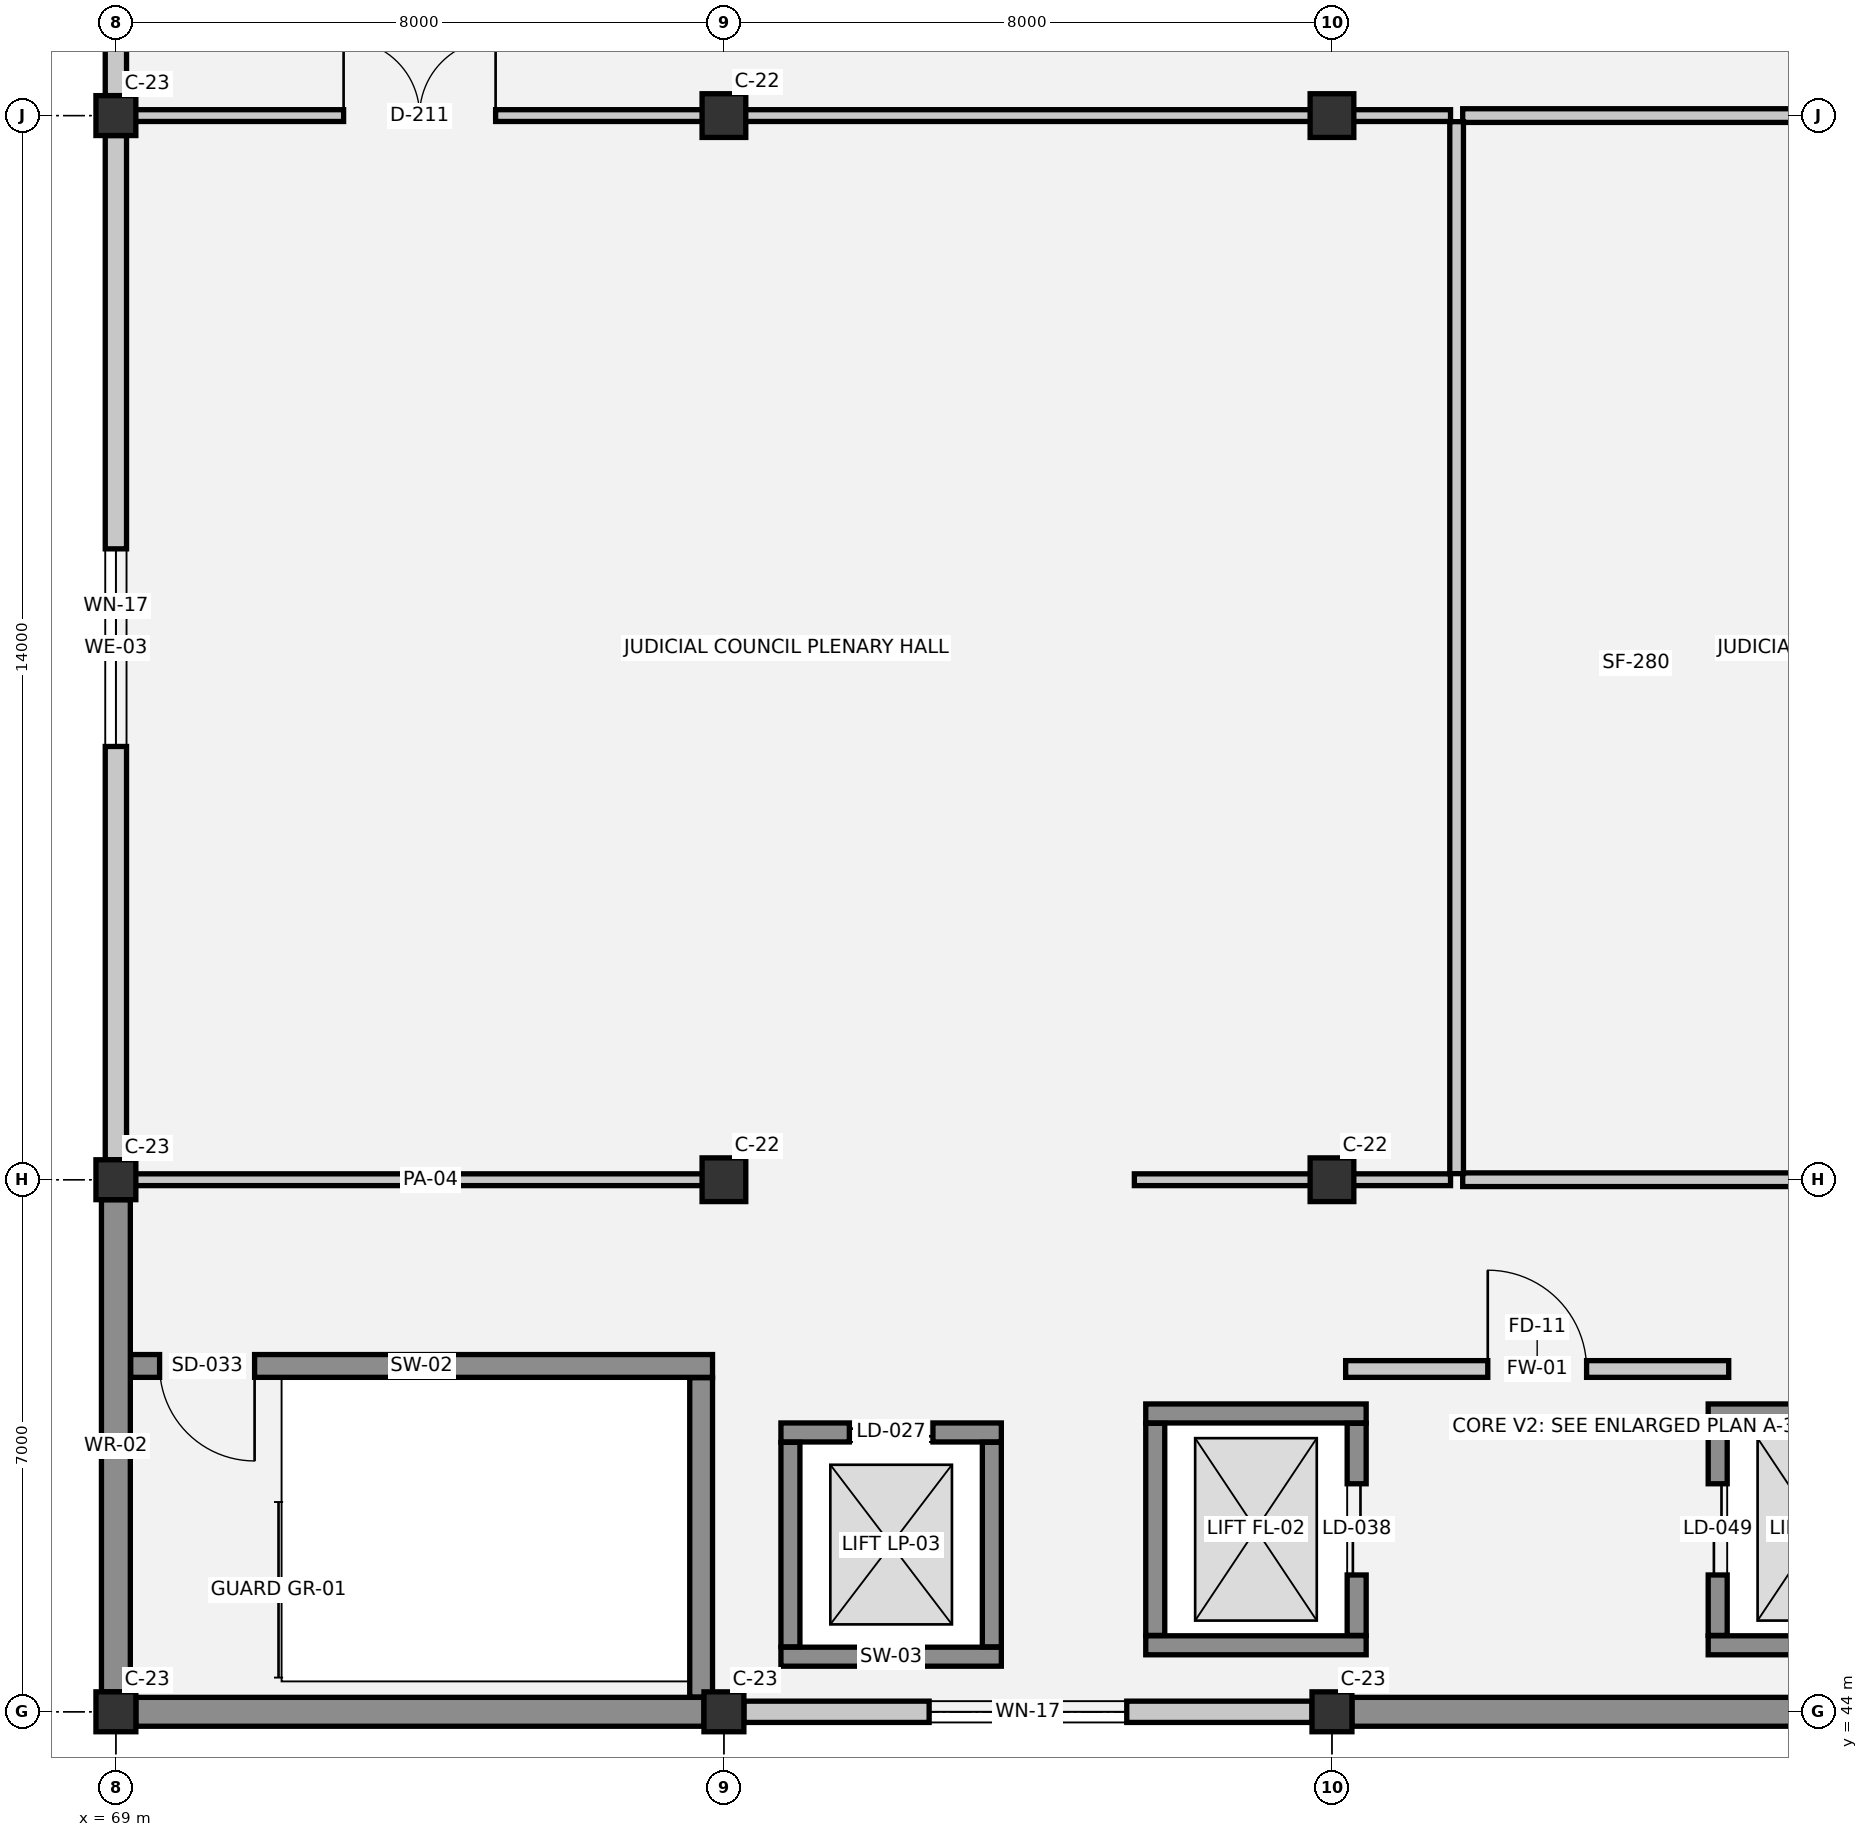
"""IFC4 building model, lengths in metres.
Left out: names, types, materials, properties, quantities, classifications, styles, units other than length and angle.
Written with IfcOpenShell. Run it as: python <this file> out.ifc"""

import sys

from ifc_helpers import new_model, si_unit, direction, frame, frame_2d, origin, origin_2d, place, context, subcontext, project, spatial, rectangle, extrude, element, fill, save


model = new_model("IFC4")
c1 = context("Model", 3, precision=1e-05, world=origin(), true_north=direction((0.0, 1.0)))
c2 = subcontext(c1, "Body", "Model", "MODEL_VIEW")
j1 = project(units=[si_unit("LENGTHUNIT", "METRE"), si_unit("PLANEANGLEUNIT", "RADIAN")], contexts=[c1])
p1 = place(None, origin())
s1 = spatial("IfcSite", under=j1, at=p1, CompositionType="ELEMENT")
p2 = place(p1, origin())
s2 = spatial("IfcBuilding", under=s1, at=p2, CompositionType="ELEMENT")
p3 = place(p2, frame((0.0, 0.0, 37.05)))
s3 = spatial("IfcBuildingStorey", under=s2, at=p3, CompositionType="ELEMENT", Elevation=37.05)
for number, where, z_axis, x_axis in (
    (1, (69.0, 44.0, 0.0), (0.0, 0.0, 1.0), (1.0, 0.0, 0.0)),
    (2, (69.0, 51.0, 0.0), (0.0, 0.0, 1.0), (1.0, 0.0, 0.0)),
    (3, (69.0, 65.0, 0.0), (0.0, 0.0, 1.0), (1.0, 0.0, 0.0)),
    (4, (77.0, 44.0, 0.0), (0.0, 0.0, 1.0), (1.0, 0.0, 0.0)),
):
    element("IfcColumn", number, at=place(p3, frame(where, z_axis=z_axis, x_axis=x_axis)), inside=s3, PredefinedType="COLUMN", context=c2, shape_type="SweptSolid", body=[
        extrude(rectangle(XDim=0.525, YDim=0.525, at=origin_2d()), origin(), (0.0, 0.0, 1.0), 3.75),
    ])
for number, where, z_axis, x_axis in (
    (5, (77.0, 51.0, 0.0), (0.0, 0.0, 1.0), (1.0, 0.0, 0.0)),
    (6, (77.0, 65.0, 0.0), (0.0, 0.0, 1.0), (1.0, 0.0, 0.0)),
):
    element("IfcColumn", number, at=place(p3, frame(where, z_axis=z_axis, x_axis=x_axis)), inside=s3, PredefinedType="COLUMN", context=c2, shape_type="SweptSolid", body=[
        extrude(rectangle(XDim=0.575, YDim=0.575, at=origin_2d()), origin(), (0.0, 0.0, 1.0), 3.75),
    ])
p4 = place(p3, frame((85.0, 44.0, 0.0), z_axis=(0.0, 0.0, 1.0), x_axis=(1.0, 0.0, 0.0)))
e7 = element("IfcColumn", 7, at=p4, inside=s3, PredefinedType="COLUMN", context=c2, shape_type="SweptSolid", body=[
    extrude(rectangle(XDim=0.525, YDim=0.525, at=origin_2d()), origin(), (0.0, 0.0, 1.0), 3.75),
])
for number, where, z_axis, x_axis in (
    (8, (85.0, 51.0, 0.0), (0.0, 0.0, 1.0), (1.0, 0.0, 0.0)),
    (9, (85.0, 65.0, 0.0), (0.0, 0.0, 1.0), (1.0, 0.0, 0.0)),
):
    element("IfcColumn", number, at=place(p3, frame(where, z_axis=z_axis, x_axis=x_axis)), inside=s3, PredefinedType="COLUMN", context=c2, shape_type="SweptSolid", body=[
        extrude(rectangle(XDim=0.575, YDim=0.575, at=origin_2d()), origin(), (0.0, 0.0, 1.0), 3.75),
    ])
p5 = place(p3, frame((69.0, 44.262, 0.0), z_axis=(0.0, 0.0, 1.0), x_axis=(0.0, 1.0, 0.0)))
e10 = element("IfcWall", 10, at=p5, inside=s3, PredefinedType="STANDARD", context=c2, shape_type="SweptSolid", body=[
    extrude(rectangle(XDim=6.475, YDim=0.38, at=frame_2d((3.238, 0.0))), origin(), (0.0, 0.0, 1.0), 2.6),
])
p6 = place(p3, frame((69.0, 51.262, 0.0), z_axis=(0.0, 0.0, 1.0), x_axis=(0.0, 1.0, 0.0)))
e11 = element("IfcWall", 11, at=p6, inside=s3, PredefinedType="SOLIDWALL", context=c2, shape_type="SweptSolid", body=[
    extrude(rectangle(XDim=13.475, YDim=0.28, at=frame_2d((6.738, 0.0))), origin(), (0.0, 0.0, 1.0), 2.6),
])
p7 = place(p6, frame((5.438, 0.0, 1.0)))
e12 = element("IfcOpeningElement", 12, at=p7, cuts=e11, PredefinedType="OPENING", context=c2, shape_type="SweptSolid", body=[
    extrude(rectangle(XDim=2.6, YDim=1.1, at=frame_2d((1.3, 0.55))), frame((0.0, 0.15, 0.0), z_axis=(0.0, -1.0, 0.0), x_axis=(1.0, 0.0, 0.0)), (0.0, 0.0, 1.0), 0.3),
])
p8 = place(p3, frame((69.0, 65.262, 0.0), z_axis=(0.0, 0.0, 1.0), x_axis=(0.0, 1.0, 0.0)))
e13 = element("IfcWall", 13, at=p8, inside=s3, PredefinedType="SOLIDWALL", context=c2, shape_type="SweptSolid", body=[
    extrude(rectangle(XDim=6.475, YDim=0.28, at=frame_2d((3.238, 0.0))), origin(), (0.0, 0.0, 1.0), 2.6),
])
p9 = place(p8, frame((2.158, 0.0, 1.0)))
e14 = element("IfcOpeningElement", 14, at=p9, cuts=e13, PredefinedType="OPENING", context=c2, shape_type="SweptSolid", body=[
    extrude(rectangle(XDim=2.6, YDim=1.1, at=frame_2d((1.3, 0.55))), frame((0.0, 0.15, 0.0), z_axis=(0.0, -1.0, 0.0), x_axis=(1.0, 0.0, 0.0)), (0.0, 0.0, 1.0), 0.3),
])
p10 = place(p3, frame((92.738, 44.0, 0.0), z_axis=(0.0, 0.0, 1.0), x_axis=(-1.0, 0.0, 0.0)))
e15 = element("IfcWall", 15, at=p10, inside=s3, PredefinedType="STANDARD", context=c2, shape_type="SweptSolid", body=[
    extrude(rectangle(XDim=7.475, YDim=0.38, at=frame_2d((3.738, 0.0))), origin(), (0.0, 0.0, 1.0), 2.6),
])
p11 = place(p3, frame((84.738, 44.0, 0.0), z_axis=(0.0, 0.0, 1.0), x_axis=(-1.0, 0.0, 0.0)))
e16 = element("IfcWall", 16, at=p11, inside=s3, PredefinedType="SOLIDWALL", context=c2, shape_type="SweptSolid", body=[
    extrude(rectangle(XDim=7.475, YDim=0.28, at=frame_2d((3.738, 0.0))), origin(), (0.0, 0.0, 1.0), 2.6),
])
p12 = place(p11, frame((2.438, 0.0, 1.0)))
e17 = element("IfcOpeningElement", 17, at=p12, cuts=e16, PredefinedType="OPENING", context=c2, shape_type="SweptSolid", body=[
    extrude(rectangle(XDim=2.6, YDim=1.1, at=frame_2d((1.3, 0.55))), frame((0.0, 0.15, 0.0), z_axis=(0.0, -1.0, 0.0), x_axis=(1.0, 0.0, 0.0)), (0.0, 0.0, 1.0), 0.3),
])
p13 = place(p3, frame((76.738, 44.0, 0.0), z_axis=(0.0, 0.0, 1.0), x_axis=(-1.0, 0.0, 0.0)))
e18 = element("IfcWall", 18, at=p13, inside=s3, PredefinedType="STANDARD", context=c2, shape_type="SweptSolid", body=[
    extrude(rectangle(XDim=7.475, YDim=0.38, at=frame_2d((3.738, 0.0))), origin(), (0.0, 0.0, 1.0), 2.6),
])
p14 = place(p3, frame((77.75, 44.725, 0.0), z_axis=(0.0, 0.0, 1.0), x_axis=(1.0, 0.0, 0.0)))
e19 = element("IfcWall", 19, at=p14, inside=s3, PredefinedType="SHEAR", context=c2, shape_type="SweptSolid", body=[
    extrude(rectangle(XDim=2.9, YDim=0.25, at=frame_2d((1.45, 0.0))), origin(), (0.0, 0.0, 1.0), 3.47),
])
p15 = place(p3, frame((80.65, 47.675, 0.0), z_axis=(0.0, 0.0, 1.0), x_axis=(-1.0, 0.0, 0.0)))
e20 = element("IfcWall", 20, at=p15, inside=s3, PredefinedType="SHEAR", context=c2, shape_type="SweptSolid", body=[
    extrude(rectangle(XDim=2.9, YDim=0.25, at=frame_2d((1.45, 0.0))), origin(), (0.0, 0.0, 1.0), 3.47),
])
p16 = place(p15, frame((0.9, 0.0, 0.0)))
e21 = element("IfcOpeningElement", 21, at=p16, cuts=e20, PredefinedType="OPENING", context=c2, shape_type="SweptSolid", body=[
    extrude(rectangle(XDim=1.1, YDim=2.15, at=frame_2d((0.55, 1.075))), frame((0.0, 0.135, 0.0), z_axis=(0.0, -1.0, 0.0), x_axis=(1.0, 0.0, 0.0)), (0.0, 0.0, 1.0), 0.27),
])
for number, where, z_axis, x_axis in (
    (22, (77.875, 47.545, 0.0), (0.0, 0.0, 1.0), (0.0, -1.0, 0.0)),
    (23, (80.525, 44.855, 0.0), (0.0, 0.0, 1.0), (0.0, 1.0, 0.0)),
):
    element("IfcWall", number, at=place(p3, frame(where, z_axis=z_axis, x_axis=x_axis)), inside=s3, PredefinedType="SHEAR", context=c2, shape_type="SweptSolid", body=[
        extrude(rectangle(XDim=2.69, YDim=0.25, at=frame_2d((1.345, 0.0))), origin(), (0.0, 0.0, 1.0), 3.47),
    ])
for number, where, z_axis, x_axis in (
    (24, (82.55, 44.875, 0.0), (0.0, 0.0, 1.0), (1.0, 0.0, 0.0)),
    (25, (85.45, 47.925, 0.0), (0.0, 0.0, 1.0), (-1.0, 0.0, 0.0)),
):
    element("IfcWall", number, at=place(p3, frame(where, z_axis=z_axis, x_axis=x_axis)), inside=s3, PredefinedType="SHEAR", context=c2, shape_type="SweptSolid", body=[
        extrude(rectangle(XDim=2.9, YDim=0.25, at=frame_2d((1.45, 0.0))), origin(), (0.0, 0.0, 1.0), 3.47),
    ])
p17 = place(p3, frame((82.675, 47.795, 0.0), z_axis=(0.0, 0.0, 1.0), x_axis=(0.0, -1.0, 0.0)))
e26 = element("IfcWall", 26, at=p17, inside=s3, PredefinedType="SHEAR", context=c2, shape_type="SweptSolid", body=[
    extrude(rectangle(XDim=2.79, YDim=0.25, at=frame_2d((1.395, 0.0))), origin(), (0.0, 0.0, 1.0), 3.47),
])
p18 = place(p3, frame((85.325, 45.005, 0.0), z_axis=(0.0, 0.0, 1.0), x_axis=(0.0, 1.0, 0.0)))
e27 = element("IfcWall", 27, at=p18, inside=s3, PredefinedType="SHEAR", context=c2, shape_type="SweptSolid", body=[
    extrude(rectangle(XDim=2.79, YDim=0.25, at=frame_2d((1.395, 0.0))), origin(), (0.0, 0.0, 1.0), 3.47),
])
p19 = place(p18, frame((0.795, 0.0, 0.0)))
e28 = element("IfcOpeningElement", 28, at=p19, cuts=e27, PredefinedType="OPENING", context=c2, shape_type="SweptSolid", body=[
    extrude(rectangle(XDim=1.2, YDim=2.2, at=frame_2d((0.6, 1.1))), frame((0.0, 0.135, 0.0), z_axis=(0.0, -1.0, 0.0), x_axis=(1.0, 0.0, 0.0)), (0.0, 0.0, 1.0), 0.27),
])
for number, where, z_axis, x_axis in (
    (29, (89.95, 44.875, 0.0), (0.0, 0.0, 1.0), (1.0, 0.0, 0.0)),
    (30, (92.85, 47.925, 0.0), (0.0, 0.0, 1.0), (-1.0, 0.0, 0.0)),
):
    element("IfcWall", number, at=place(p3, frame(where, z_axis=z_axis, x_axis=x_axis)), inside=s3, PredefinedType="SHEAR", context=c2, shape_type="SweptSolid", body=[
        extrude(rectangle(XDim=2.9, YDim=0.25, at=frame_2d((1.45, 0.0))), origin(), (0.0, 0.0, 1.0), 3.47),
    ])
p20 = place(p3, frame((90.075, 47.795, 0.0), z_axis=(0.0, 0.0, 1.0), x_axis=(0.0, -1.0, 0.0)))
e31 = element("IfcWall", 31, at=p20, inside=s3, PredefinedType="SHEAR", context=c2, shape_type="SweptSolid", body=[
    extrude(rectangle(XDim=2.79, YDim=0.25, at=frame_2d((1.395, 0.0))), origin(), (0.0, 0.0, 1.0), 3.47),
])
p21 = place(p20, frame((0.795, 0.0, 0.0)))
e32 = element("IfcOpeningElement", 32, at=p21, cuts=e31, PredefinedType="OPENING", context=c2, shape_type="SweptSolid", body=[
    extrude(rectangle(XDim=1.2, YDim=2.2, at=frame_2d((0.6, 1.1))), frame((0.0, 0.135, 0.0), z_axis=(0.0, -1.0, 0.0), x_axis=(1.0, 0.0, 0.0)), (0.0, 0.0, 1.0), 0.27),
])
p22 = place(p3, frame((76.85, 48.55, 0.0), z_axis=(0.0, 0.0, 1.0), x_axis=(-1.0, 0.0, 0.0)))
e33 = element("IfcWall", 33, at=p22, inside=s3, PredefinedType="SHEAR", context=c2, shape_type="SweptSolid", body=[
    extrude(rectangle(XDim=7.655, YDim=0.3, at=frame_2d((3.828, 0.0))), origin(), (0.0, 0.0, 1.0), 3.47),
])
p23 = place(p22, frame((6.025, 0.0, 0.0)))
e34 = element("IfcOpeningElement", 34, at=p23, cuts=e33, PredefinedType="OPENING", context=c2, shape_type="SweptSolid", body=[
    extrude(rectangle(XDim=1.25, YDim=2.15, at=frame_2d((0.625, 1.075))), frame((0.0, 0.16, 0.0), z_axis=(0.0, -1.0, 0.0), x_axis=(1.0, 0.0, 0.0)), (0.0, 0.0, 1.0), 0.32),
])
p24 = place(p3, frame((76.7, 44.195, 0.0), z_axis=(0.0, 0.0, 1.0), x_axis=(0.0, 1.0, 0.0)))
e35 = element("IfcWall", 35, at=p24, inside=s3, PredefinedType="SHEAR", context=c2, shape_type="SweptSolid", body=[
    extrude(rectangle(XDim=4.2, YDim=0.3, at=frame_2d((2.1, 0.0))), origin(), (0.0, 0.0, 1.0), 3.47),
])
p25 = place(p3, frame((85.18, 48.51, 0.0), z_axis=(0.0, 0.0, 1.0), x_axis=(1.0, 0.0, 0.0)))
e36 = element("IfcWall", 36, at=p25, inside=s3, PredefinedType="SOLIDWALL", context=c2, shape_type="SweptSolid", body=[
    extrude(rectangle(XDim=5.04, YDim=0.22, at=frame_2d((2.52, 0.0))), origin(), (0.0, 0.0, 1.0), 3.47),
])
p26 = place(p25, frame((1.87, 0.0, 0.0)))
e37 = element("IfcOpeningElement", 37, at=p26, cuts=e36, PredefinedType="OPENING", context=c2, shape_type="SweptSolid", body=[
    extrude(rectangle(XDim=1.3, YDim=2.15, at=frame_2d((0.65, 1.075))), frame((0.0, 0.12, 0.0), z_axis=(0.0, -1.0, 0.0), x_axis=(1.0, 0.0, 0.0)), (0.0, 0.0, 1.0), 0.24),
])
p27 = place(p3, frame((69.08, 51.0, 0.0), z_axis=(0.0, 0.0, 1.0), x_axis=(1.0, 0.0, 0.0)))
e38 = element("IfcWall", 38, at=p27, inside=s3, PredefinedType="PARTITIONING", context=c2, shape_type="SweptSolid", body=[
    extrude(rectangle(XDim=8.12, YDim=0.155, at=frame_2d((4.06, 0.0))), origin(), (0.0, 0.0, 1.0), 2.82),
])
p28 = place(p3, frame((82.4, 51.0, 0.0), z_axis=(0.0, 0.0, 1.0), x_axis=(1.0, 0.0, 0.0)))
e39 = element("IfcWall", 39, at=p28, inside=s3, PredefinedType="PARTITIONING", context=c2, shape_type="SweptSolid", body=[
    extrude(rectangle(XDim=4.16, YDim=0.155, at=frame_2d((2.08, 0.0))), origin(), (0.0, 0.0, 1.0), 2.82),
])
p29 = place(p3, frame((86.72, 51.0, 0.0), z_axis=(0.0, 0.0, 1.0), x_axis=(1.0, 0.0, 0.0)))
e40 = element("IfcWall", 40, at=p29, inside=s3, PredefinedType="PARTITIONING", context=c2, shape_type="SweptSolid", body=[
    extrude(rectangle(XDim=11.6, YDim=0.18, at=frame_2d((5.8, 0.0))), origin(), (0.0, 0.0, 1.0), 2.82),
])
p30 = place(p3, frame((69.08, 65.0, 0.0), z_axis=(0.0, 0.0, 1.0), x_axis=(1.0, 0.0, 0.0)))
e41 = element("IfcWall", 41, at=p30, inside=s3, PredefinedType="PARTITIONING", context=c2, shape_type="SweptSolid", body=[
    extrude(rectangle(XDim=17.48, YDim=0.155, at=frame_2d((8.74, 0.0))), origin(), (0.0, 0.0, 1.0), 2.82),
])
p31 = place(p30, frame((2.916, 0.0, 0.0)))
e42 = element("IfcOpeningElement", 42, at=p31, cuts=e41, PredefinedType="OPENING", context=c2, shape_type="SweptSolid", body=[
    extrude(rectangle(XDim=2.0, YDim=2.35, at=frame_2d((1.0, 1.175))), frame((0.0, 0.087, 0.0), z_axis=(0.0, -1.0, 0.0), x_axis=(1.0, 0.0, 0.0)), (0.0, 0.0, 1.0), 0.175),
])
p32 = place(p3, frame((86.72, 65.0, 0.0), z_axis=(0.0, 0.0, 1.0), x_axis=(1.0, 0.0, 0.0)))
e43 = element("IfcWall", 43, at=p32, inside=s3, PredefinedType="PARTITIONING", context=c2, shape_type="SweptSolid", body=[
    extrude(rectangle(XDim=11.6, YDim=0.18, at=frame_2d((5.8, 0.0))), origin(), (0.0, 0.0, 1.0), 2.82),
])
p33 = place(p3, frame((86.64, 51.08, 0.0), z_axis=(0.0, 0.0, 1.0), x_axis=(0.0, 1.0, 0.0)))
e44 = element("IfcWall", 44, at=p33, inside=s3, PredefinedType="PARTITIONING", context=c2, shape_type="SweptSolid", body=[
    extrude(rectangle(XDim=13.84, YDim=0.18, at=frame_2d((6.92, 0.0))), origin(), (0.0, 0.0, 1.0), 3.39),
])
p34 = place(p7, origin())
e45 = element("IfcWindow", 45, at=p34, inside=s3, PartitioningType="SINGLE_PANEL", PredefinedType="WINDOW", context=c2, shape_type="SweptSolid", body=[
    extrude(rectangle(XDim=2.6, YDim=1.1, at=frame_2d((1.3, 0.55))), frame((0.0, 0.03, 0.0), z_axis=(0.0, -1.0, 0.0), x_axis=(1.0, 0.0, 0.0)), (0.0, 0.0, 1.0), 0.06),
])
fill(e12, e45)
p35 = place(p12, origin())
e46 = element("IfcWindow", 46, at=p35, inside=s3, PartitioningType="SINGLE_PANEL", PredefinedType="WINDOW", context=c2, shape_type="SweptSolid", body=[
    extrude(rectangle(XDim=2.6, YDim=1.1, at=frame_2d((1.3, 0.55))), frame((0.0, 0.03, 0.0), z_axis=(0.0, -1.0, 0.0), x_axis=(1.0, 0.0, 0.0)), (0.0, 0.0, 1.0), 0.06),
])
fill(e17, e46)
p36 = place(p16, origin())
e47 = element("IfcDoor", 47, at=p36, inside=s3, OperationType="DOUBLE_DOOR_SLIDING", PredefinedType="DOOR", context=c2, shape_type="SweptSolid", body=[
    extrude(rectangle(XDim=1.1, YDim=2.15, at=frame_2d((0.55, 1.075))), frame((0.0, 0.025, 0.0), z_axis=(0.0, -1.0, 0.0), x_axis=(1.0, 0.0, 0.0)), (0.0, 0.0, 1.0), 0.05),
])
fill(e21, e47)
p37 = place(p19, origin())
e48 = element("IfcDoor", 48, at=p37, inside=s3, OperationType="DOUBLE_DOOR_SLIDING", PredefinedType="DOOR", context=c2, shape_type="SweptSolid", body=[
    extrude(rectangle(XDim=1.2, YDim=2.2, at=frame_2d((0.6, 1.1))), frame((0.0, 0.025, 0.0), z_axis=(0.0, -1.0, 0.0), x_axis=(1.0, 0.0, 0.0)), (0.0, 0.0, 1.0), 0.05),
])
fill(e28, e48)
p38 = place(p21, origin())
e49 = element("IfcDoor", 49, at=p38, inside=s3, OperationType="DOUBLE_DOOR_SLIDING", PredefinedType="DOOR", context=c2, shape_type="SweptSolid", body=[
    extrude(rectangle(XDim=1.2, YDim=2.2, at=frame_2d((0.6, 1.1))), frame((0.0, 0.025, 0.0), z_axis=(0.0, -1.0, 0.0), x_axis=(1.0, 0.0, 0.0)), (0.0, 0.0, 1.0), 0.05),
])
fill(e32, e49)
p39 = place(p23, origin())
e50 = element("IfcDoor", 50, at=p39, inside=s3, OperationType="SINGLE_SWING_LEFT", PredefinedType="DOOR", context=c2, shape_type="SweptSolid", body=[
    extrude(rectangle(XDim=1.25, YDim=2.15, at=frame_2d((0.625, 1.075))), frame((0.0, 0.025, 0.0), z_axis=(0.0, -1.0, 0.0), x_axis=(1.0, 0.0, 0.0)), (0.0, 0.0, 1.0), 0.05),
])
fill(e34, e50)
p40 = place(p26, origin())
e51 = element("IfcDoor", 51, at=p40, inside=s3, OperationType="SINGLE_SWING_LEFT", PredefinedType="DOOR", context=c2, shape_type="SweptSolid", body=[
    extrude(rectangle(XDim=1.3, YDim=2.15, at=frame_2d((0.65, 1.075))), frame((0.0, 0.025, 0.0), z_axis=(0.0, -1.0, 0.0), x_axis=(1.0, 0.0, 0.0)), (0.0, 0.0, 1.0), 0.05),
])
fill(e37, e51)
p41 = place(p31, origin())
e52 = element("IfcDoor", 52, at=p41, inside=s3, OperationType="DOUBLE_DOOR_SINGLE_SWING", PredefinedType="DOOR", context=c2, shape_type="SweptSolid", body=[
    extrude(rectangle(XDim=2.0, YDim=2.35, at=frame_2d((1.0, 1.175))), frame((0.0, 0.025, 0.0), z_axis=(0.0, -1.0, 0.0), x_axis=(1.0, 0.0, 0.0)), (0.0, 0.0, 1.0), 0.05),
])
fill(e42, e52)
save(model, sys.argv[1])
